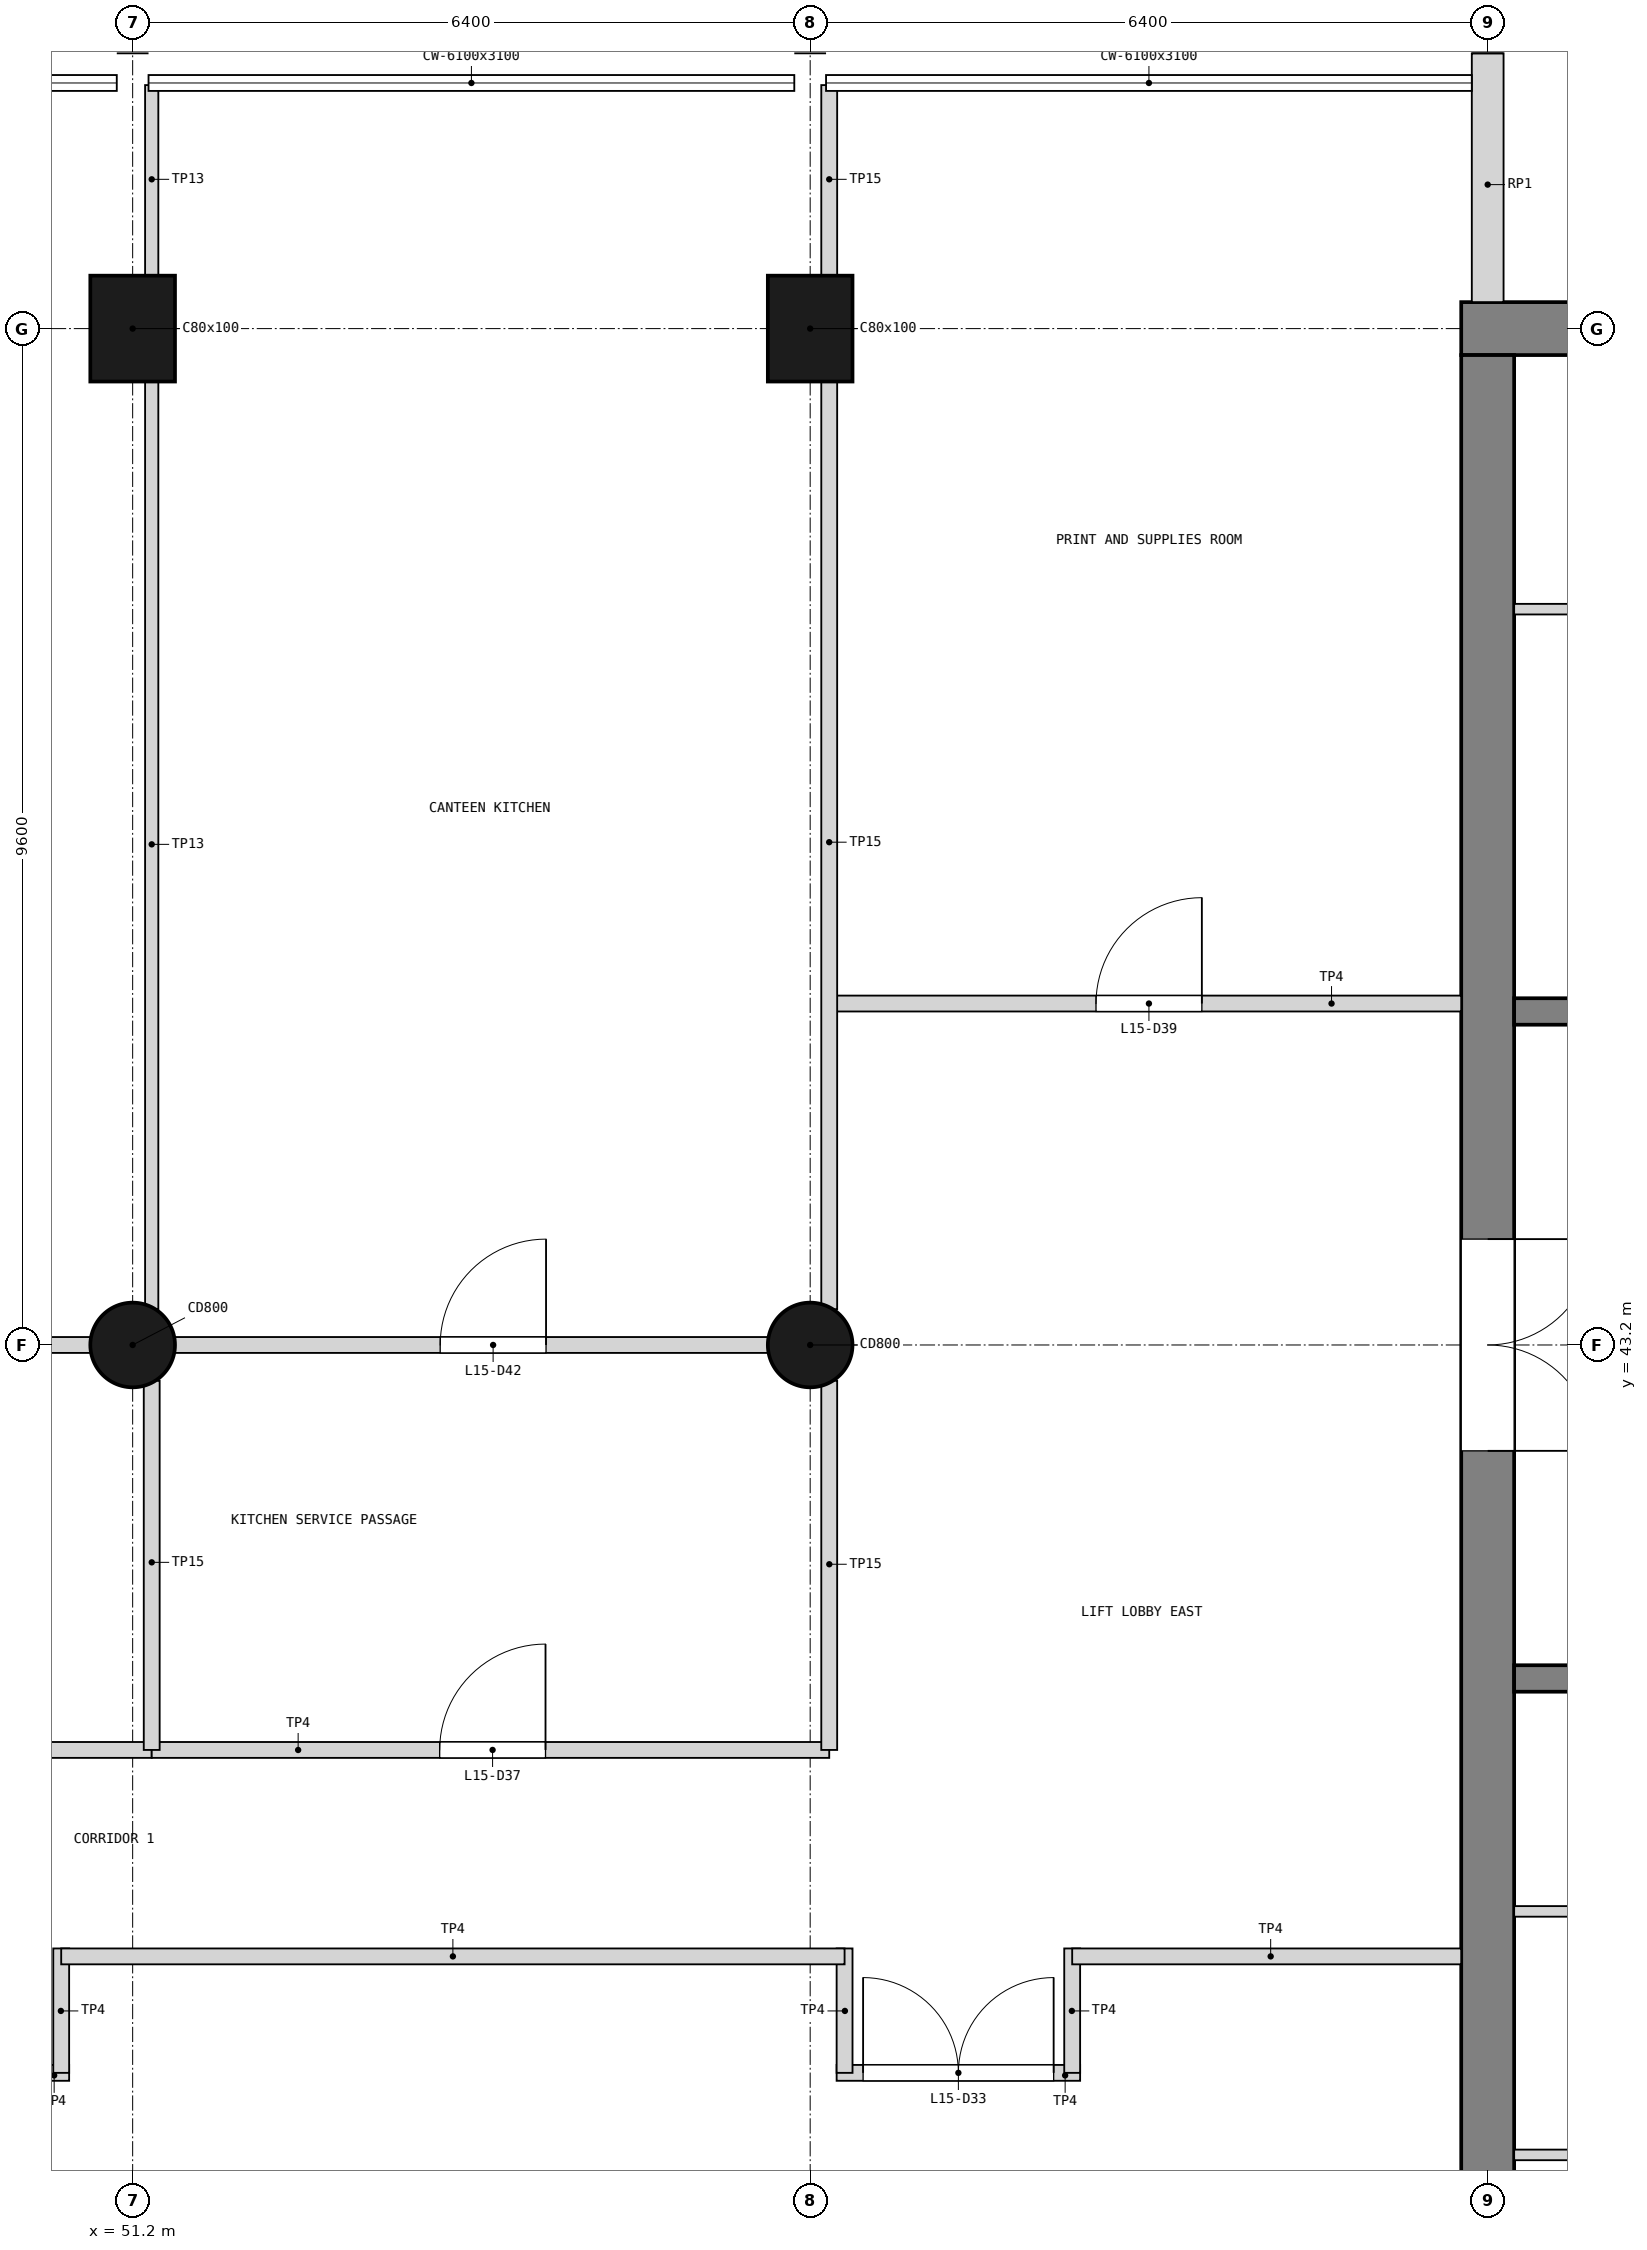
"""IFC4 building model, lengths in metres.
Left out: names, types, materials, properties, quantities, classifications, styles, units other than length and angle.
Written with IfcOpenShell. Run it as: python <this file> out.ifc"""

import sys

from ifc_helpers import new_model, si_unit, direction, frame, frame_2d, origin, origin_2d, place, context, subcontext, project, spatial, rectangle, circle, extrude, element, fill, save


model = new_model("IFC4")
c1 = context("Model", 3, precision=1e-05, world=origin(), true_north=direction((0.0, 1.0)))
c2 = subcontext(c1, "Body", "Model", "MODEL_VIEW")
j1 = project(units=[si_unit("LENGTHUNIT", "METRE"), si_unit("PLANEANGLEUNIT", "RADIAN")], contexts=[c1])
p1 = place(None, origin())
s1 = spatial("IfcSite", under=j1, at=p1, CompositionType="ELEMENT")
p2 = place(p1, origin())
s2 = spatial("IfcBuilding", under=s1, at=p2, CompositionType="ELEMENT")
p3 = place(p2, frame((0.0, 0.0, 60.0)))
s3 = spatial("IfcBuildingStorey", under=s2, at=p3, CompositionType="ELEMENT", Elevation=60.0)
p4 = place(p3, frame((63.75, 52.8, 0.0), z_axis=(0.0, 0.0, 1.0), x_axis=(1.0, 0.0, 0.0)))
e1 = element("IfcWall", 1, at=p4, inside=s3, PredefinedType="SHEAR", context=c2, shape_type="SweptSolid", body=[
    extrude(rectangle(XDim=13.3, YDim=0.5, at=frame_2d((6.65, 0.0))), origin(), (0.0, 0.0, 1.0), 4.2),
])
p5 = place(p4, frame((11.05, 0.0, 1.0)))
e2 = element("IfcOpeningElement", 2, at=p5, cuts=e1, PredefinedType="OPENING", context=c2, shape_type="SweptSolid", body=[
    extrude(rectangle(XDim=0.4, YDim=2.0, at=frame_2d((0.2, 1.0))), frame((0.0, 0.26, 0.0), z_axis=(0.0, -1.0, 0.0), x_axis=(1.0, 0.0, 0.0)), (0.0, 0.0, 1.0), 0.52),
])
p6 = place(p3, frame((64.0, 33.85, 0.0), z_axis=(0.0, 0.0, 1.0), x_axis=(0.0, 1.0, 0.0)))
e3 = element("IfcWall", 3, at=p6, inside=s3, PredefinedType="SHEAR", context=c2, shape_type="SweptSolid", body=[
    extrude(rectangle(XDim=18.7, YDim=0.5, at=frame_2d((9.35, 0.0))), origin(), (0.0, 0.0, 1.0), 4.2),
])
p7 = place(p6, frame((8.35, 0.0, 0.0)))
e4 = element("IfcOpeningElement", 4, at=p7, cuts=e3, PredefinedType="OPENING", context=c2, shape_type="SweptSolid", body=[
    extrude(rectangle(XDim=2.0, YDim=2.1, at=frame_2d((1.0, 1.05))), frame((0.0, 0.26, 0.0), z_axis=(0.0, -1.0, 0.0), x_axis=(1.0, 0.0, 0.0)), (0.0, 0.0, 1.0), 0.52),
])
p8 = place(p3, frame((51.2, 43.2, 0.0), z_axis=(0.0, 0.0, 1.0), x_axis=(1.0, 0.0, 0.0)))
e5 = element("IfcColumn", 5, at=p8, inside=s3, PredefinedType="COLUMN", context=c2, shape_type="SweptSolid", body=[
    extrude(circle(Radius=0.4, at=origin_2d()), origin(), (0.0, 0.0, 1.0), 4.2),
])
p9 = place(p3, frame((51.2, 52.8, 0.0), z_axis=(0.0, 0.0, 1.0), x_axis=(1.0, 0.0, 0.0)))
e6 = element("IfcColumn", 6, at=p9, inside=s3, PredefinedType="COLUMN", context=c2, shape_type="SweptSolid", body=[
    extrude(rectangle(XDim=0.8, YDim=1.0, at=origin_2d()), origin(), (0.0, 0.0, 1.0), 4.2),
])
p10 = place(p3, frame((57.6, 43.2, 0.0), z_axis=(0.0, 0.0, 1.0), x_axis=(1.0, 0.0, 0.0)))
e7 = element("IfcColumn", 7, at=p10, inside=s3, PredefinedType="COLUMN", context=c2, shape_type="SweptSolid", body=[
    extrude(circle(Radius=0.4, at=origin_2d()), origin(), (0.0, 0.0, 1.0), 4.2),
])
p11 = place(p3, frame((57.6, 52.8, 0.0), z_axis=(0.0, 0.0, 1.0), x_axis=(1.0, 0.0, 0.0)))
e8 = element("IfcColumn", 8, at=p11, inside=s3, PredefinedType="COLUMN", context=c2, shape_type="SweptSolid", body=[
    extrude(rectangle(XDim=0.8, YDim=1.0, at=origin_2d()), origin(), (0.0, 0.0, 1.0), 4.2),
])
p12 = place(p3, frame((64.0, 53.05, 0.0), z_axis=(0.0, 0.0, 1.0), x_axis=(0.0, 1.0, 0.0)))
e9 = element("IfcWall", 9, at=p12, inside=s3, PredefinedType="SOLIDWALL", context=c2, shape_type="SweptSolid", body=[
    extrude(rectangle(XDim=2.35, YDim=0.3, at=frame_2d((1.175, 0.0))), origin(), (0.0, 0.0, 1.0), 3.1),
])
for number, where, z_axis, x_axis in (
    (10, (69.725, 40.05, 0.0), (0.0, 0.0, 1.0), (-1.0, 0.0, 0.0)),
    (11, (69.725, 46.35, 0.0), (0.0, 0.0, 1.0), (-1.0, 0.0, 0.0)),
):
    element("IfcWall", number, at=place(p3, frame(where, z_axis=z_axis, x_axis=x_axis)), inside=s3, PredefinedType="SOLIDWALL", context=c2, shape_type="SweptSolid", body=[
        extrude(rectangle(XDim=5.475, YDim=0.25, at=frame_2d((2.738, 0.0))), origin(), (0.0, 0.0, 1.0), 3.9),
    ])
p13 = place(p3, frame((69.475, 35.55, 0.0), z_axis=(0.0, 0.0, 1.0), x_axis=(-1.0, 0.0, 0.0)))
e12 = element("IfcWall", 12, at=p13, inside=s3, PredefinedType="PARTITIONING", context=c2, shape_type="SweptSolid", body=[
    extrude(rectangle(XDim=5.225, YDim=0.1, at=frame_2d((2.613, 0.0))), origin(), (0.0, 0.0, 1.0), 3.9),
])
p14 = place(p3, frame((67.925, 37.85, 0.0), z_axis=(0.0, 0.0, 1.0), x_axis=(-1.0, 0.0, 0.0)))
e13 = element("IfcWall", 13, at=p14, inside=s3, PredefinedType="PARTITIONING", context=c2, shape_type="SweptSolid", body=[
    extrude(rectangle(XDim=3.675, YDim=0.1, at=frame_2d((1.837, 0.0))), origin(), (0.0, 0.0, 1.0), 3.9),
])
p15 = place(p3, frame((69.475, 50.15, 0.0), z_axis=(0.0, 0.0, 1.0), x_axis=(-1.0, 0.0, 0.0)))
e14 = element("IfcWall", 14, at=p15, inside=s3, PredefinedType="PARTITIONING", context=c2, shape_type="SweptSolid", body=[
    extrude(rectangle(XDim=5.225, YDim=0.1, at=frame_2d((2.613, 0.0))), origin(), (0.0, 0.0, 1.0), 3.9),
])
p16 = place(p3, frame((44.62, 39.375, 0.0), z_axis=(0.0, 0.0, 1.0), x_axis=(1.0, 0.0, 0.0)))
e15 = element("IfcWall", 15, at=p16, inside=s3, PredefinedType="PARTITIONING", context=c2, shape_type="SweptSolid", body=[
    extrude(rectangle(XDim=6.76, YDim=0.15, at=frame_2d((3.38, 0.0))), origin(), (0.0, 0.0, 1.0), 3.9),
])
p17 = place(p16, frame((2.88, 0.0, 0.0)))
e16 = element("IfcOpeningElement", 16, at=p17, cuts=e15, PredefinedType="OPENING", context=c2, shape_type="SweptSolid", body=[
    extrude(rectangle(XDim=1.0, YDim=2.1, at=frame_2d((0.5, 1.05))), frame((0.0, 0.085, 0.0), z_axis=(0.0, -1.0, 0.0), x_axis=(1.0, 0.0, 0.0)), (0.0, 0.0, 1.0), 0.17),
])
p18 = place(p3, frame((51.38, 39.375, 0.0), z_axis=(0.0, 0.0, 1.0), x_axis=(1.0, 0.0, 0.0)))
e17 = element("IfcWall", 17, at=p18, inside=s3, PredefinedType="PARTITIONING", context=c2, shape_type="SweptSolid", body=[
    extrude(rectangle(XDim=6.4, YDim=0.15, at=frame_2d((3.2, 0.0))), origin(), (0.0, 0.0, 1.0), 3.9),
])
p19 = place(p18, frame((2.72, 0.0, 0.0)))
e18 = element("IfcOpeningElement", 18, at=p19, cuts=e17, PredefinedType="OPENING", context=c2, shape_type="SweptSolid", body=[
    extrude(rectangle(XDim=1.0, YDim=2.1, at=frame_2d((0.5, 1.05))), frame((0.0, 0.085, 0.0), z_axis=(0.0, -1.0, 0.0), x_axis=(1.0, 0.0, 0.0)), (0.0, 0.0, 1.0), 0.17),
])
p20 = place(p3, frame((51.38, 39.375, 0.0), z_axis=(0.0, 0.0, 1.0), x_axis=(0.0, 1.0, 0.0)))
e19 = element("IfcWall", 19, at=p20, inside=s3, PredefinedType="PARTITIONING", context=c2, shape_type="SweptSolid", body=[
    extrude(rectangle(XDim=3.488, YDim=0.15, at=frame_2d((1.744, 0.0))), origin(), (0.0, 0.0, 1.0), 3.0),
])
p21 = place(p3, frame((51.38, 43.537, 0.0), z_axis=(0.0, 0.0, 1.0), x_axis=(0.0, 1.0, 0.0)))
e20 = element("IfcWall", 20, at=p21, inside=s3, PredefinedType="PARTITIONING", context=c2, shape_type="SweptSolid", body=[
    extrude(rectangle(XDim=8.783, YDim=0.125, at=frame_2d((4.392, 0.0))), origin(), (0.0, 0.0, 1.0), 3.0),
])
p22 = place(p3, frame((51.38, 53.28, 0.0), z_axis=(0.0, 0.0, 1.0), x_axis=(0.0, 1.0, 0.0)))
e21 = element("IfcWall", 21, at=p22, inside=s3, PredefinedType="PARTITIONING", context=c2, shape_type="SweptSolid", body=[
    extrude(rectangle(XDim=1.82, YDim=0.125, at=frame_2d((0.91, 0.0))), origin(), (0.0, 0.0, 1.0), 3.0),
])
p23 = place(p3, frame((31.82, 43.2, 0.0), z_axis=(0.0, 0.0, 1.0), x_axis=(1.0, 0.0, 0.0)))
e22 = element("IfcWall", 22, at=p23, inside=s3, PredefinedType="PARTITIONING", context=c2, shape_type="SweptSolid", body=[
    extrude(rectangle(XDim=25.96, YDim=0.15, at=frame_2d((12.98, 0.0))), origin(), (0.0, 0.0, 1.0), 3.1),
])
p24 = place(p23, frame((2.325, 0.0, 0.0)))
e23 = element("IfcOpeningElement", 23, at=p24, cuts=e22, PredefinedType="OPENING", context=c2, shape_type="SweptSolid", body=[
    extrude(rectangle(XDim=1.8, YDim=2.1, at=frame_2d((0.9, 1.05))), frame((0.0, 0.085, 0.0), z_axis=(0.0, -1.0, 0.0), x_axis=(1.0, 0.0, 0.0)), (0.0, 0.0, 1.0), 0.17),
])
p25 = place(p23, frame((8.675, 0.0, 0.0)))
e24 = element("IfcOpeningElement", 24, at=p25, cuts=e22, PredefinedType="OPENING", context=c2, shape_type="SweptSolid", body=[
    extrude(rectangle(XDim=1.8, YDim=2.1, at=frame_2d((0.9, 1.05))), frame((0.0, 0.085, 0.0), z_axis=(0.0, -1.0, 0.0), x_axis=(1.0, 0.0, 0.0)), (0.0, 0.0, 1.0), 0.17),
])
p26 = place(p23, frame((22.285, 0.0, 0.0)))
e25 = element("IfcOpeningElement", 25, at=p26, cuts=e22, PredefinedType="OPENING", context=c2, shape_type="SweptSolid", body=[
    extrude(rectangle(XDim=1.0, YDim=2.1, at=frame_2d((0.5, 1.05))), frame((0.0, 0.085, 0.0), z_axis=(0.0, -1.0, 0.0), x_axis=(1.0, 0.0, 0.0)), (0.0, 0.0, 1.0), 0.17),
])
p27 = place(p3, frame((57.78, 46.425, 0.0), z_axis=(0.0, 0.0, 1.0), x_axis=(1.0, 0.0, 0.0)))
e26 = element("IfcWall", 26, at=p27, inside=s3, PredefinedType="PARTITIONING", context=c2, shape_type="SweptSolid", body=[
    extrude(rectangle(XDim=5.97, YDim=0.15, at=frame_2d((2.985, 0.0))), origin(), (0.0, 0.0, 1.0), 3.9),
])
p28 = place(p27, frame((2.52, 0.0, 0.0)))
e27 = element("IfcOpeningElement", 27, at=p28, cuts=e26, PredefinedType="OPENING", context=c2, shape_type="SweptSolid", body=[
    extrude(rectangle(XDim=1.0, YDim=2.1, at=frame_2d((0.5, 1.05))), frame((0.0, 0.085, 0.0), z_axis=(0.0, -1.0, 0.0), x_axis=(1.0, 0.0, 0.0)), (0.0, 0.0, 1.0), 0.17),
])
p29 = place(p3, frame((57.78, 39.375, 0.0), z_axis=(0.0, 0.0, 1.0), x_axis=(0.0, 1.0, 0.0)))
e28 = element("IfcWall", 28, at=p29, inside=s3, PredefinedType="PARTITIONING", context=c2, shape_type="SweptSolid", body=[
    extrude(rectangle(XDim=3.488, YDim=0.15, at=frame_2d((1.744, 0.0))), origin(), (0.0, 0.0, 1.0), 3.0),
])
p30 = place(p3, frame((57.78, 43.537, 0.0), z_axis=(0.0, 0.0, 1.0), x_axis=(0.0, 1.0, 0.0)))
e29 = element("IfcWall", 29, at=p30, inside=s3, PredefinedType="PARTITIONING", context=c2, shape_type="SweptSolid", body=[
    extrude(rectangle(XDim=8.783, YDim=0.15, at=frame_2d((4.392, 0.0))), origin(), (0.0, 0.0, 1.0), 3.0),
])
p31 = place(p3, frame((57.78, 53.28, 0.0), z_axis=(0.0, 0.0, 1.0), x_axis=(0.0, 1.0, 0.0)))
e30 = element("IfcWall", 30, at=p31, inside=s3, PredefinedType="PARTITIONING", context=c2, shape_type="SweptSolid", body=[
    extrude(rectangle(XDim=1.82, YDim=0.15, at=frame_2d((0.91, 0.0))), origin(), (0.0, 0.0, 1.0), 3.0),
])
p32 = place(p3, frame((48.3, 36.325, 0.0), z_axis=(0.0, 0.0, 1.0), x_axis=(1.0, 0.0, 0.0)))
e31 = element("IfcWall", 31, at=p32, inside=s3, PredefinedType="PARTITIONING", context=c2, shape_type="SweptSolid", body=[
    extrude(rectangle(XDim=2.3, YDim=0.15, at=frame_2d((1.15, 0.0))), origin(), (0.0, 0.0, 1.0), 3.9),
])
p33 = place(p32, frame((0.25, 0.0, 0.0)))
e32 = element("IfcOpeningElement", 32, at=p33, cuts=e31, PredefinedType="OPENING", context=c2, shape_type="SweptSolid", body=[
    extrude(rectangle(XDim=1.8, YDim=2.1, at=frame_2d((0.9, 1.05))), frame((0.0, 0.085, 0.0), z_axis=(0.0, -1.0, 0.0), x_axis=(1.0, 0.0, 0.0)), (0.0, 0.0, 1.0), 0.17),
])
p34 = place(p3, frame((50.525, 37.5, 0.0), z_axis=(0.0, 0.0, 1.0), x_axis=(0.0, -1.0, 0.0)))
e33 = element("IfcWall", 33, at=p34, inside=s3, PredefinedType="PARTITIONING", context=c2, shape_type="SweptSolid", body=[
    extrude(rectangle(XDim=1.175, YDim=0.15, at=frame_2d((0.587, 0.0))), origin(), (0.0, 0.0, 1.0), 3.9),
])
p35 = place(p3, frame((57.85, 36.325, 0.0), z_axis=(0.0, 0.0, 1.0), x_axis=(1.0, 0.0, 0.0)))
e34 = element("IfcWall", 34, at=p35, inside=s3, PredefinedType="PARTITIONING", context=c2, shape_type="SweptSolid", body=[
    extrude(rectangle(XDim=2.3, YDim=0.15, at=frame_2d((1.15, 0.0))), origin(), (0.0, 0.0, 1.0), 3.9),
])
p36 = place(p35, frame((0.25, 0.0, 0.0)))
e35 = element("IfcOpeningElement", 35, at=p36, cuts=e34, PredefinedType="OPENING", context=c2, shape_type="SweptSolid", body=[
    extrude(rectangle(XDim=1.8, YDim=2.1, at=frame_2d((0.9, 1.05))), frame((0.0, 0.085, 0.0), z_axis=(0.0, -1.0, 0.0), x_axis=(1.0, 0.0, 0.0)), (0.0, 0.0, 1.0), 0.17),
])
for number, where, z_axis, x_axis in (
    (36, (57.925, 37.5, 0.0), (0.0, 0.0, 1.0), (0.0, -1.0, 0.0)),
    (37, (60.075, 37.5, 0.0), (0.0, 0.0, 1.0), (0.0, -1.0, 0.0)),
):
    element("IfcWall", number, at=place(p3, frame(where, z_axis=z_axis, x_axis=x_axis)), inside=s3, PredefinedType="PARTITIONING", context=c2, shape_type="SweptSolid", body=[
        extrude(rectangle(XDim=1.175, YDim=0.15, at=frame_2d((0.587, 0.0))), origin(), (0.0, 0.0, 1.0), 3.9),
    ])
p37 = place(p3, frame((50.525, 37.425, 0.0), z_axis=(0.0, 0.0, 1.0), x_axis=(1.0, 0.0, 0.0)))
e38 = element("IfcWall", 38, at=p37, inside=s3, PredefinedType="PARTITIONING", context=c2, shape_type="SweptSolid", body=[
    extrude(rectangle(XDim=7.4, YDim=0.15, at=frame_2d((3.7, 0.0))), origin(), (0.0, 0.0, 1.0), 3.9),
])
p38 = place(p3, frame((60.075, 37.425, 0.0), z_axis=(0.0, 0.0, 1.0), x_axis=(1.0, 0.0, 0.0)))
e39 = element("IfcWall", 39, at=p38, inside=s3, PredefinedType="PARTITIONING", context=c2, shape_type="SweptSolid", body=[
    extrude(rectangle(XDim=3.675, YDim=0.15, at=frame_2d((1.837, 0.0))), origin(), (0.0, 0.0, 1.0), 3.9),
])
p39 = place(p7, frame((2.0, 0.0, 0.0), z_axis=(0.0, 0.0, 1.0), x_axis=(-1.0, 0.0, 0.0)))
e40 = element("IfcDoor", 40, at=p39, inside=s3, OperationType="DOUBLE_DOOR_SINGLE_SWING", PredefinedType="DOOR", context=c2, shape_type="SweptSolid", body=[
    extrude(rectangle(XDim=2.0, YDim=2.1, at=frame_2d((1.0, 1.05))), frame((0.0, 0.025, 0.0), z_axis=(0.0, -1.0, 0.0), x_axis=(1.0, 0.0, 0.0)), (0.0, 0.0, 1.0), 0.05),
])
fill(e4, e40)
p40 = place(p36, origin())
e41 = element("IfcDoor", 41, at=p40, inside=s3, OperationType="DOUBLE_DOOR_SINGLE_SWING", PredefinedType="DOOR", context=c2, shape_type="SweptSolid", body=[
    extrude(rectangle(XDim=1.8, YDim=2.1, at=frame_2d((0.9, 1.05))), frame((0.0, 0.025, 0.0), z_axis=(0.0, -1.0, 0.0), x_axis=(1.0, 0.0, 0.0)), (0.0, 0.0, 1.0), 0.05),
])
fill(e35, e41)
p41 = place(p19, origin())
e42 = element("IfcDoor", 42, at=p41, inside=s3, OperationType="SINGLE_SWING_RIGHT", PredefinedType="DOOR", context=c2, shape_type="SweptSolid", body=[
    extrude(rectangle(XDim=1.0, YDim=2.1, at=frame_2d((0.5, 1.05))), frame((0.0, 0.025, 0.0), z_axis=(0.0, -1.0, 0.0), x_axis=(1.0, 0.0, 0.0)), (0.0, 0.0, 1.0), 0.05),
])
fill(e18, e42)
p42 = place(p28, origin())
e43 = element("IfcDoor", 43, at=p42, inside=s3, OperationType="SINGLE_SWING_RIGHT", PredefinedType="DOOR", context=c2, shape_type="SweptSolid", body=[
    extrude(rectangle(XDim=1.0, YDim=2.1, at=frame_2d((0.5, 1.05))), frame((0.0, 0.025, 0.0), z_axis=(0.0, -1.0, 0.0), x_axis=(1.0, 0.0, 0.0)), (0.0, 0.0, 1.0), 0.05),
])
fill(e27, e43)
p43 = place(p26, origin())
e44 = element("IfcDoor", 44, at=p43, inside=s3, OperationType="SINGLE_SWING_RIGHT", PredefinedType="DOOR", context=c2, shape_type="SweptSolid", body=[
    extrude(rectangle(XDim=1.0, YDim=2.1, at=frame_2d((0.5, 1.05))), frame((0.0, 0.025, 0.0), z_axis=(0.0, -1.0, 0.0), x_axis=(1.0, 0.0, 0.0)), (0.0, 0.0, 1.0), 0.05),
])
fill(e25, e44)
save(model, sys.argv[1])
